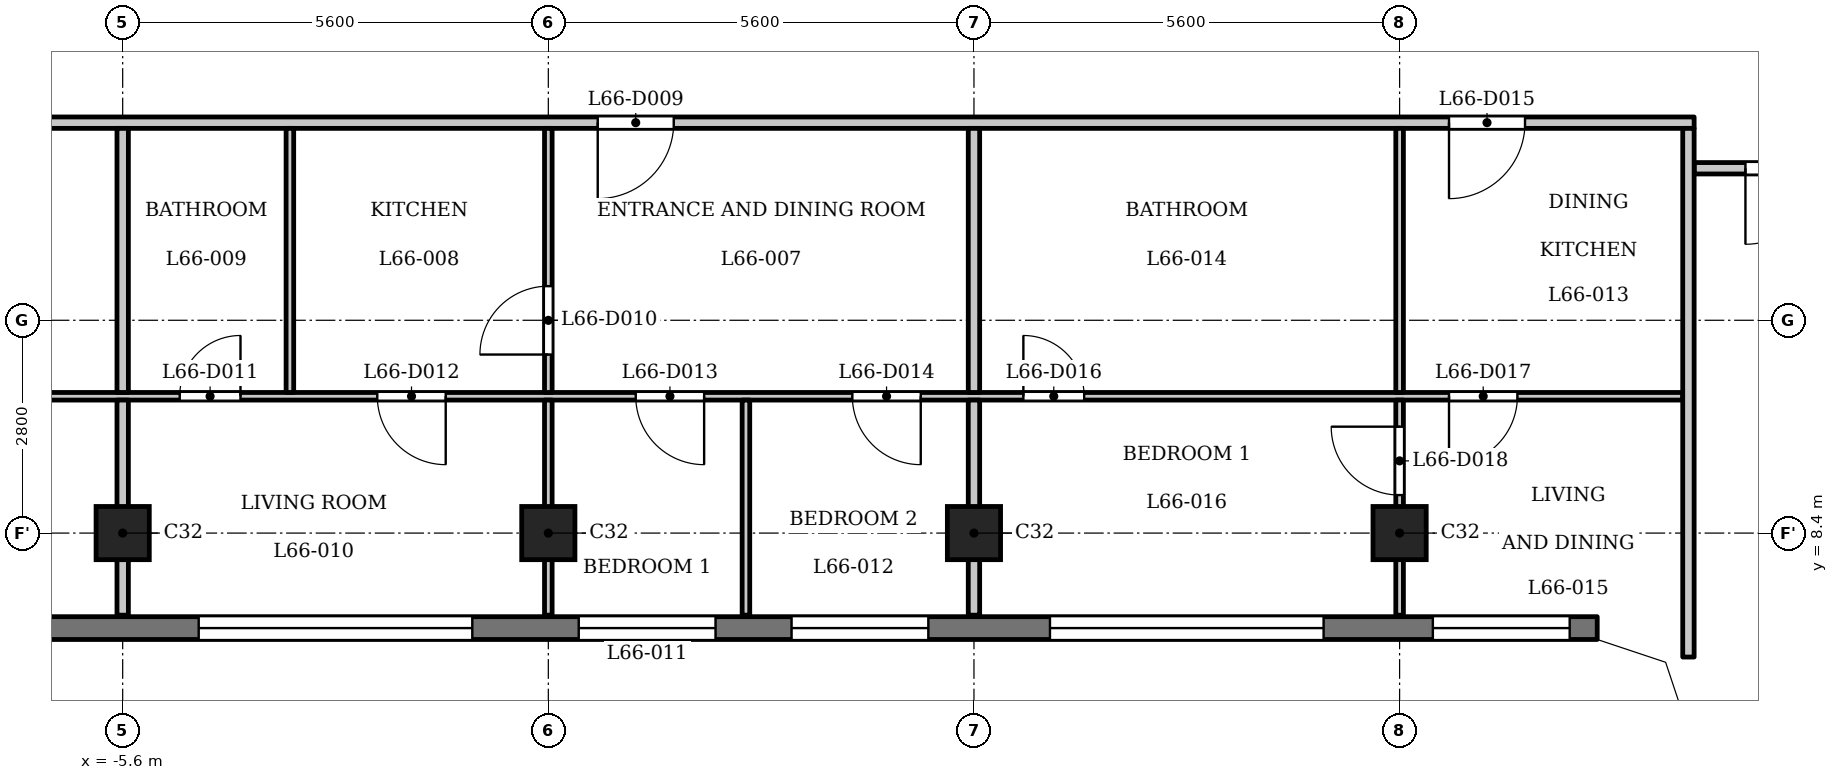
"""IFC4 building model, lengths in metres.
Left out: names, types, materials, properties, quantities, classifications, styles, units other than length and angle.
Written with IfcOpenShell. Run it as: python <this file> out.ifc"""

import sys

from ifc_helpers import new_model, si_unit, direction, frame, frame_2d, origin, origin_2d, place, context, subcontext, project, spatial, polyline, rectangle, outline, extrude, element, fill, save


model = new_model("IFC4")
c1 = context("Model", 3, precision=1e-05, world=origin(), true_north=direction((0.0, 1.0)))
c2 = subcontext(c1, "Body", "Model", "MODEL_VIEW")
j1 = project(units=[si_unit("LENGTHUNIT", "METRE"), si_unit("PLANEANGLEUNIT", "RADIAN")], contexts=[c1])
p1 = place(None, origin())
s1 = spatial("IfcSite", under=j1, at=p1, CompositionType="ELEMENT")
p2 = place(p1, origin())
s2 = spatial("IfcBuilding", under=s1, at=p2, CompositionType="ELEMENT")
p3 = place(p2, frame((0.0, 0.0, 255.7)))
s3 = spatial("IfcBuildingStorey", under=s2, at=p3, CompositionType="ELEMENT", Elevation=255.7)
for number, where, z_axis, x_axis in (
    (1, (-5.6, 8.4, 0.0), (0.0, 0.0, 1.0), (1.0, 0.0, 0.0)),
    (2, (0.0, 8.4, 0.0), (0.0, 0.0, 1.0), (1.0, 0.0, 0.0)),
    (3, (5.6, 8.4, 0.0), (0.0, 0.0, 1.0), (1.0, 0.0, 0.0)),
    (4, (11.2, 8.4, 0.0), (0.0, 0.0, 1.0), (1.0, 0.0, 0.0)),
):
    element("IfcColumn", number, at=place(p3, frame(where, z_axis=z_axis, x_axis=x_axis)), inside=s3, PredefinedType="COLUMN", context=c2, shape_type="SweptSolid", body=[
        extrude(rectangle(XDim=0.7, YDim=0.7, at=origin_2d()), origin(), (0.0, 0.0, 1.0), 3.5),
    ])
p4 = place(p3, frame((-13.8, 7.15, 0.0), z_axis=(0.0, 0.0, 1.0), x_axis=(1.0, 0.0, 0.0)))
e5 = element("IfcWall", 5, at=p4, inside=s3, PredefinedType="SOLIDWALL", context=c2, shape_type="SweptSolid", body=[
    extrude(rectangle(XDim=27.6, YDim=0.3, at=frame_2d((13.8, 0.0))), origin(), (0.0, 0.0, 1.0), 3.2),
])
p5 = place(p4, frame((0.363, 0.0, 0.9)))
e6 = element("IfcOpeningElement", 6, at=p5, cuts=e5, PredefinedType="OPENING", context=c2, shape_type="SweptSolid", body=[
    extrude(rectangle(XDim=1.8, YDim=1.25, at=frame_2d((0.9, 0.625))), frame((0.0, 0.16, 0.0), z_axis=(0.0, -1.0, 0.0), x_axis=(1.0, 0.0, 0.0)), (0.0, 0.0, 1.0), 0.32),
])
p6 = place(p4, frame((3.6, 0.0, 1.2)))
e7 = element("IfcOpeningElement", 7, at=p6, cuts=e5, PredefinedType="OPENING", context=c2, shape_type="SweptSolid", body=[
    extrude(rectangle(XDim=3.6, YDim=0.95, at=frame_2d((1.8, 0.475))), frame((0.0, 0.16, 0.0), z_axis=(0.0, -1.0, 0.0), x_axis=(1.0, 0.0, 0.0)), (0.0, 0.0, 1.0), 0.32),
])
p7 = place(p4, frame((9.2, 0.0, 1.2)))
e8 = element("IfcOpeningElement", 8, at=p7, cuts=e5, PredefinedType="OPENING", context=c2, shape_type="SweptSolid", body=[
    extrude(rectangle(XDim=3.6, YDim=0.95, at=frame_2d((1.8, 0.475))), frame((0.0, 0.16, 0.0), z_axis=(0.0, -1.0, 0.0), x_axis=(1.0, 0.0, 0.0)), (0.0, 0.0, 1.0), 0.32),
])
p8 = place(p4, frame((14.2, 0.0, 0.9)))
e9 = element("IfcOpeningElement", 9, at=p8, cuts=e5, PredefinedType="OPENING", context=c2, shape_type="SweptSolid", body=[
    extrude(rectangle(XDim=1.8, YDim=1.25, at=frame_2d((0.9, 0.625))), frame((0.0, 0.16, 0.0), z_axis=(0.0, -1.0, 0.0), x_axis=(1.0, 0.0, 0.0)), (0.0, 0.0, 1.0), 0.32),
])
p9 = place(p4, frame((17.0, 0.0, 0.9)))
e10 = element("IfcOpeningElement", 10, at=p9, cuts=e5, PredefinedType="OPENING", context=c2, shape_type="SweptSolid", body=[
    extrude(rectangle(XDim=1.8, YDim=1.25, at=frame_2d((0.9, 0.625))), frame((0.0, 0.16, 0.0), z_axis=(0.0, -1.0, 0.0), x_axis=(1.0, 0.0, 0.0)), (0.0, 0.0, 1.0), 0.32),
])
p10 = place(p4, frame((20.4, 0.0, 1.2)))
e11 = element("IfcOpeningElement", 11, at=p10, cuts=e5, PredefinedType="OPENING", context=c2, shape_type="SweptSolid", body=[
    extrude(rectangle(XDim=3.6, YDim=0.95, at=frame_2d((1.8, 0.475))), frame((0.0, 0.16, 0.0), z_axis=(0.0, -1.0, 0.0), x_axis=(1.0, 0.0, 0.0)), (0.0, 0.0, 1.0), 0.32),
])
p11 = place(p4, frame((25.438, 0.0, 0.9)))
e12 = element("IfcOpeningElement", 12, at=p11, cuts=e5, PredefinedType="OPENING", context=c2, shape_type="SweptSolid", body=[
    extrude(rectangle(XDim=1.8, YDim=1.25, at=frame_2d((0.9, 0.625))), frame((0.0, 0.16, 0.0), z_axis=(0.0, -1.0, 0.0), x_axis=(1.0, 0.0, 0.0)), (0.0, 0.0, 1.0), 0.32),
])
p12 = place(p3, frame((-14.925, 10.2, 0.0), z_axis=(0.0, 0.0, 1.0), x_axis=(1.0, 0.0, 0.0)))
e13 = element("IfcWall", 13, at=p12, inside=s3, PredefinedType="PARTITIONING", context=c2, shape_type="SweptSolid", body=[
    extrude(rectangle(XDim=29.85, YDim=0.1, at=frame_2d((14.925, 0.0))), origin(), (0.0, 0.0, 1.0), 3.2),
])
p13 = place(p12, frame((4.375, 0.0, 0.0)))
e14 = element("IfcOpeningElement", 14, at=p13, cuts=e13, PredefinedType="OPENING", context=c2, shape_type="SweptSolid", body=[
    extrude(rectangle(XDim=0.8, YDim=2.1, at=frame_2d((0.4, 1.05))), frame((0.0, 0.06, 0.0), z_axis=(0.0, -1.0, 0.0), x_axis=(1.0, 0.0, 0.0)), (0.0, 0.0, 1.0), 0.12),
])
p14 = place(p12, frame((0.576, 0.0, 0.0)))
e15 = element("IfcOpeningElement", 15, at=p14, cuts=e13, PredefinedType="OPENING", context=c2, shape_type="SweptSolid", body=[
    extrude(rectangle(XDim=0.9, YDim=2.1, at=frame_2d((0.45, 1.05))), frame((0.0, 0.06, 0.0), z_axis=(0.0, -1.0, 0.0), x_axis=(1.0, 0.0, 0.0)), (0.0, 0.0, 1.0), 0.12),
])
p15 = place(p12, frame((10.075, 0.0, 0.0)))
e16 = element("IfcOpeningElement", 16, at=p15, cuts=e13, PredefinedType="OPENING", context=c2, shape_type="SweptSolid", body=[
    extrude(rectangle(XDim=0.8, YDim=2.1, at=frame_2d((0.4, 1.05))), frame((0.0, 0.06, 0.0), z_axis=(0.0, -1.0, 0.0), x_axis=(1.0, 0.0, 0.0)), (0.0, 0.0, 1.0), 0.12),
])
p16 = place(p12, frame((12.675, 0.0, 0.0)))
e17 = element("IfcOpeningElement", 17, at=p16, cuts=e13, PredefinedType="OPENING", context=c2, shape_type="SweptSolid", body=[
    extrude(rectangle(XDim=0.9, YDim=2.1, at=frame_2d((0.45, 1.05))), frame((0.0, 0.06, 0.0), z_axis=(0.0, -1.0, 0.0), x_axis=(1.0, 0.0, 0.0)), (0.0, 0.0, 1.0), 0.12),
])
p17 = place(p12, frame((16.075, 0.0, 0.0)))
e18 = element("IfcOpeningElement", 18, at=p17, cuts=e13, PredefinedType="OPENING", context=c2, shape_type="SweptSolid", body=[
    extrude(rectangle(XDim=0.9, YDim=2.1, at=frame_2d((0.45, 1.05))), frame((0.0, 0.06, 0.0), z_axis=(0.0, -1.0, 0.0), x_axis=(1.0, 0.0, 0.0)), (0.0, 0.0, 1.0), 0.12),
])
p18 = place(p12, frame((18.925, 0.0, 0.0)))
e19 = element("IfcOpeningElement", 19, at=p18, cuts=e13, PredefinedType="OPENING", context=c2, shape_type="SweptSolid", body=[
    extrude(rectangle(XDim=0.9, YDim=2.1, at=frame_2d((0.45, 1.05))), frame((0.0, 0.06, 0.0), z_axis=(0.0, -1.0, 0.0), x_axis=(1.0, 0.0, 0.0)), (0.0, 0.0, 1.0), 0.12),
])
p19 = place(p12, frame((21.175, 0.0, 0.0)))
e20 = element("IfcOpeningElement", 20, at=p19, cuts=e13, PredefinedType="OPENING", context=c2, shape_type="SweptSolid", body=[
    extrude(rectangle(XDim=0.8, YDim=2.1, at=frame_2d((0.4, 1.05))), frame((0.0, 0.06, 0.0), z_axis=(0.0, -1.0, 0.0), x_axis=(1.0, 0.0, 0.0)), (0.0, 0.0, 1.0), 0.12),
])
p20 = place(p12, frame((26.775, 0.0, 0.0)))
e21 = element("IfcOpeningElement", 21, at=p20, cuts=e13, PredefinedType="OPENING", context=c2, shape_type="SweptSolid", body=[
    extrude(rectangle(XDim=0.9, YDim=2.1, at=frame_2d((0.45, 1.05))), frame((0.0, 0.06, 0.0), z_axis=(0.0, -1.0, 0.0), x_axis=(1.0, 0.0, 0.0)), (0.0, 0.0, 1.0), 0.12),
])
p21 = place(p3, frame((15.075, 13.2, 0.0), z_axis=(0.0, 0.0, 1.0), x_axis=(1.0, 0.0, 0.0)))
e22 = element("IfcWall", 22, at=p21, inside=s3, PredefinedType="PARTITIONING", context=c2, shape_type="SweptSolid", body=[
    extrude(rectangle(XDim=2.325, YDim=0.15, at=frame_2d((1.163, 0.0))), origin(), (0.0, 0.0, 1.0), 3.2),
])
p22 = place(p21, frame((0.675, 0.0, 0.0)))
e23 = element("IfcOpeningElement", 23, at=p22, cuts=e22, PredefinedType="OPENING", context=c2, shape_type="SweptSolid", body=[
    extrude(rectangle(XDim=1.0, YDim=2.1, at=frame_2d((0.5, 1.05))), frame((0.0, 0.085, 0.0), z_axis=(0.0, -1.0, 0.0), x_axis=(1.0, 0.0, 0.0)), (0.0, 0.0, 1.0), 0.17),
])
p23 = place(p3, frame((-15.075, 13.8, 0.0), z_axis=(0.0, 0.0, 1.0), x_axis=(1.0, 0.0, 0.0)))
e24 = element("IfcWall", 24, at=p23, inside=s3, PredefinedType="PARTITIONING", context=c2, shape_type="SweptSolid", body=[
    extrude(rectangle(XDim=30.15, YDim=0.15, at=frame_2d((15.075, 0.0))), origin(), (0.0, 0.0, 1.0), 3.2),
])
p24 = place(p23, frame((0.726, 0.0, 0.0)))
e25 = element("IfcOpeningElement", 25, at=p24, cuts=e24, PredefinedType="OPENING", context=c2, shape_type="SweptSolid", body=[
    extrude(rectangle(XDim=1.0, YDim=2.1, at=frame_2d((0.5, 1.05))), frame((0.0, 0.085, 0.0), z_axis=(0.0, -1.0, 0.0), x_axis=(1.0, 0.0, 0.0)), (0.0, 0.0, 1.0), 0.17),
])
p25 = place(p23, frame((15.725, 0.0, 0.0)))
e26 = element("IfcOpeningElement", 26, at=p25, cuts=e24, PredefinedType="OPENING", context=c2, shape_type="SweptSolid", body=[
    extrude(rectangle(XDim=1.0, YDim=2.1, at=frame_2d((0.5, 1.05))), frame((0.0, 0.085, 0.0), z_axis=(0.0, -1.0, 0.0), x_axis=(1.0, 0.0, 0.0)), (0.0, 0.0, 1.0), 0.17),
])
p26 = place(p23, frame((26.925, 0.0, 0.0)))
e27 = element("IfcOpeningElement", 27, at=p26, cuts=e24, PredefinedType="OPENING", context=c2, shape_type="SweptSolid", body=[
    extrude(rectangle(XDim=1.0, YDim=2.1, at=frame_2d((0.5, 1.05))), frame((0.0, 0.085, 0.0), z_axis=(0.0, -1.0, 0.0), x_axis=(1.0, 0.0, 0.0)), (0.0, 0.0, 1.0), 0.17),
])
p27 = place(p3, frame((-5.6, 7.32, 0.0), z_axis=(0.0, 0.0, 1.0), x_axis=(0.0, 1.0, 0.0)))
e28 = element("IfcWall", 28, at=p27, inside=s3, PredefinedType="PARTITIONING", context=c2, shape_type="SweptSolid", body=[
    extrude(rectangle(XDim=2.83, YDim=0.15, at=frame_2d((1.415, 0.0))), origin(), (0.0, 0.0, 1.0), 3.2),
])
p28 = place(p3, frame((-5.6, 10.25, 0.0), z_axis=(0.0, 0.0, 1.0), x_axis=(0.0, 1.0, 0.0)))
e29 = element("IfcWall", 29, at=p28, inside=s3, PredefinedType="PARTITIONING", context=c2, shape_type="SweptSolid", body=[
    extrude(rectangle(XDim=3.475, YDim=0.15, at=frame_2d((1.738, 0.0))), origin(), (0.0, 0.0, 1.0), 3.2),
])
p29 = place(p3, frame((-3.4, 10.25, 0.0), z_axis=(0.0, 0.0, 1.0), x_axis=(0.0, 1.0, 0.0)))
e30 = element("IfcWall", 30, at=p29, inside=s3, PredefinedType="PARTITIONING", context=c2, shape_type="SweptSolid", body=[
    extrude(rectangle(XDim=3.475, YDim=0.1, at=frame_2d((1.738, 0.0))), origin(), (0.0, 0.0, 1.0), 3.2),
])
p30 = place(p3, frame((0.0, 7.32, 0.0), z_axis=(0.0, 0.0, 1.0), x_axis=(0.0, 1.0, 0.0)))
e31 = element("IfcWall", 31, at=p30, inside=s3, PredefinedType="PARTITIONING", context=c2, shape_type="SweptSolid", body=[
    extrude(rectangle(XDim=2.83, YDim=0.1, at=frame_2d((1.415, 0.0))), origin(), (0.0, 0.0, 1.0), 3.2),
])
p31 = place(p3, frame((0.0, 10.25, 0.0), z_axis=(0.0, 0.0, 1.0), x_axis=(0.0, 1.0, 0.0)))
e32 = element("IfcWall", 32, at=p31, inside=s3, PredefinedType="PARTITIONING", context=c2, shape_type="SweptSolid", body=[
    extrude(rectangle(XDim=3.475, YDim=0.1, at=frame_2d((1.738, 0.0))), origin(), (0.0, 0.0, 1.0), 3.2),
])
p32 = place(p31, frame((0.499, 0.0, 0.0)))
e33 = element("IfcOpeningElement", 33, at=p32, cuts=e32, PredefinedType="OPENING", context=c2, shape_type="SweptSolid", body=[
    extrude(rectangle(XDim=0.9, YDim=2.1, at=frame_2d((0.45, 1.05))), frame((0.0, 0.06, 0.0), z_axis=(0.0, -1.0, 0.0), x_axis=(1.0, 0.0, 0.0)), (0.0, 0.0, 1.0), 0.12),
])
p33 = place(p3, frame((2.6, 7.32, 0.0), z_axis=(0.0, 0.0, 1.0), x_axis=(0.0, 1.0, 0.0)))
e34 = element("IfcWall", 34, at=p33, inside=s3, PredefinedType="PARTITIONING", context=c2, shape_type="SweptSolid", body=[
    extrude(rectangle(XDim=2.83, YDim=0.1, at=frame_2d((1.415, 0.0))), origin(), (0.0, 0.0, 1.0), 3.2),
])
p34 = place(p3, frame((5.6, 7.32, 0.0), z_axis=(0.0, 0.0, 1.0), x_axis=(0.0, 1.0, 0.0)))
e35 = element("IfcWall", 35, at=p34, inside=s3, PredefinedType="PARTITIONING", context=c2, shape_type="SweptSolid", body=[
    extrude(rectangle(XDim=2.83, YDim=0.15, at=frame_2d((1.415, 0.0))), origin(), (0.0, 0.0, 1.0), 3.2),
])
p35 = place(p3, frame((5.6, 10.25, 0.0), z_axis=(0.0, 0.0, 1.0), x_axis=(0.0, 1.0, 0.0)))
e36 = element("IfcWall", 36, at=p35, inside=s3, PredefinedType="PARTITIONING", context=c2, shape_type="SweptSolid", body=[
    extrude(rectangle(XDim=3.475, YDim=0.15, at=frame_2d((1.738, 0.0))), origin(), (0.0, 0.0, 1.0), 3.2),
])
p36 = place(p3, frame((11.2, 7.32, 0.0), z_axis=(0.0, 0.0, 1.0), x_axis=(0.0, 1.0, 0.0)))
e37 = element("IfcWall", 37, at=p36, inside=s3, PredefinedType="PARTITIONING", context=c2, shape_type="SweptSolid", body=[
    extrude(rectangle(XDim=2.83, YDim=0.1, at=frame_2d((1.415, 0.0))), origin(), (0.0, 0.0, 1.0), 3.2),
])
p37 = place(p36, frame((1.58, 0.0, 0.0)))
e38 = element("IfcOpeningElement", 38, at=p37, cuts=e37, PredefinedType="OPENING", context=c2, shape_type="SweptSolid", body=[
    extrude(rectangle(XDim=0.9, YDim=2.1, at=frame_2d((0.45, 1.05))), frame((0.0, 0.06, 0.0), z_axis=(0.0, -1.0, 0.0), x_axis=(1.0, 0.0, 0.0)), (0.0, 0.0, 1.0), 0.12),
])
p38 = place(p3, frame((11.2, 10.25, 0.0), z_axis=(0.0, 0.0, 1.0), x_axis=(0.0, 1.0, 0.0)))
e39 = element("IfcWall", 39, at=p38, inside=s3, PredefinedType="PARTITIONING", context=c2, shape_type="SweptSolid", body=[
    extrude(rectangle(XDim=3.475, YDim=0.1, at=frame_2d((1.738, 0.0))), origin(), (0.0, 0.0, 1.0), 3.2),
])
p39 = place(p3, frame((15.0, 6.769, 0.0), z_axis=(0.0, 0.0, 1.0), x_axis=(0.0, 1.0, 0.0)))
e40 = element("IfcWall", 40, at=p39, inside=s3, PredefinedType="PARTITIONING", context=c2, shape_type="SweptSolid", body=[
    extrude(rectangle(XDim=6.956, YDim=0.15, at=frame_2d((3.478, 0.0))), origin(), (0.0, 0.0, 1.0), 3.2),
])
p40 = place(p3, origin())
e41 = element("IfcWall", 41, at=p40, inside=s3, PredefinedType="SOLIDWALL", context=c2, shape_type="SweptSolid", body=[
    extrude(outline(polyline([(14.937, 6.937), (13.849, 7.3), (13.8, 7.3), (13.8, 7.0), (14.7, 6.7), (15.0, 5.8), (15.3, 5.8), (15.3, 5.849), (14.937, 6.937)])), origin(), (0.0, 0.0, 1.0), 3.2),
])
p41 = place(p22, origin())
e42 = element("IfcDoor", 42, at=p41, inside=s3, OperationType="SINGLE_SWING_LEFT", PredefinedType="DOOR", context=c2, shape_type="SweptSolid", body=[
    extrude(rectangle(XDim=1.0, YDim=2.1, at=frame_2d((0.5, 1.05))), frame((0.0, 0.025, 0.0), z_axis=(0.0, -1.0, 0.0), x_axis=(1.0, 0.0, 0.0)), (0.0, 0.0, 1.0), 0.05),
])
fill(e23, e42)
p42 = place(p25, origin())
e43 = element("IfcDoor", 43, at=p42, inside=s3, OperationType="SINGLE_SWING_LEFT", PredefinedType="DOOR", context=c2, shape_type="SweptSolid", body=[
    extrude(rectangle(XDim=1.0, YDim=2.1, at=frame_2d((0.5, 1.05))), frame((0.0, 0.025, 0.0), z_axis=(0.0, -1.0, 0.0), x_axis=(1.0, 0.0, 0.0)), (0.0, 0.0, 1.0), 0.05),
])
fill(e26, e43)
p43 = place(p32, origin())
e44 = element("IfcDoor", 44, at=p43, inside=s3, OperationType="SINGLE_SWING_RIGHT", PredefinedType="DOOR", context=c2, shape_type="SweptSolid", body=[
    extrude(rectangle(XDim=0.9, YDim=2.1, at=frame_2d((0.45, 1.05))), frame((0.0, 0.025, 0.0), z_axis=(0.0, -1.0, 0.0), x_axis=(1.0, 0.0, 0.0)), (0.0, 0.0, 1.0), 0.05),
])
fill(e33, e44)
p44 = place(p15, origin())
e45 = element("IfcDoor", 45, at=p44, inside=s3, OperationType="SINGLE_SWING_LEFT", PredefinedType="DOOR", context=c2, shape_type="SweptSolid", body=[
    extrude(rectangle(XDim=0.8, YDim=2.1, at=frame_2d((0.4, 1.05))), frame((0.0, 0.025, 0.0), z_axis=(0.0, -1.0, 0.0), x_axis=(1.0, 0.0, 0.0)), (0.0, 0.0, 1.0), 0.05),
])
fill(e16, e45)
p45 = place(p16, origin())
e46 = element("IfcDoor", 46, at=p45, inside=s3, OperationType="SINGLE_SWING_RIGHT", PredefinedType="DOOR", context=c2, shape_type="SweptSolid", body=[
    extrude(rectangle(XDim=0.9, YDim=2.1, at=frame_2d((0.45, 1.05))), frame((0.0, 0.025, 0.0), z_axis=(0.0, -1.0, 0.0), x_axis=(1.0, 0.0, 0.0)), (0.0, 0.0, 1.0), 0.05),
])
fill(e17, e46)
p46 = place(p17, origin())
e47 = element("IfcDoor", 47, at=p46, inside=s3, OperationType="SINGLE_SWING_RIGHT", PredefinedType="DOOR", context=c2, shape_type="SweptSolid", body=[
    extrude(rectangle(XDim=0.9, YDim=2.1, at=frame_2d((0.45, 1.05))), frame((0.0, 0.025, 0.0), z_axis=(0.0, -1.0, 0.0), x_axis=(1.0, 0.0, 0.0)), (0.0, 0.0, 1.0), 0.05),
])
fill(e18, e47)
p47 = place(p18, origin())
e48 = element("IfcDoor", 48, at=p47, inside=s3, OperationType="SINGLE_SWING_RIGHT", PredefinedType="DOOR", context=c2, shape_type="SweptSolid", body=[
    extrude(rectangle(XDim=0.9, YDim=2.1, at=frame_2d((0.45, 1.05))), frame((0.0, 0.025, 0.0), z_axis=(0.0, -1.0, 0.0), x_axis=(1.0, 0.0, 0.0)), (0.0, 0.0, 1.0), 0.05),
])
fill(e19, e48)
p48 = place(p26, origin())
e49 = element("IfcDoor", 49, at=p48, inside=s3, OperationType="SINGLE_SWING_LEFT", PredefinedType="DOOR", context=c2, shape_type="SweptSolid", body=[
    extrude(rectangle(XDim=1.0, YDim=2.1, at=frame_2d((0.5, 1.05))), frame((0.0, 0.025, 0.0), z_axis=(0.0, -1.0, 0.0), x_axis=(1.0, 0.0, 0.0)), (0.0, 0.0, 1.0), 0.05),
])
fill(e27, e49)
p49 = place(p19, origin())
e50 = element("IfcDoor", 50, at=p49, inside=s3, OperationType="SINGLE_SWING_RIGHT", PredefinedType="DOOR", context=c2, shape_type="SweptSolid", body=[
    extrude(rectangle(XDim=0.8, YDim=2.1, at=frame_2d((0.4, 1.05))), frame((0.0, 0.025, 0.0), z_axis=(0.0, -1.0, 0.0), x_axis=(1.0, 0.0, 0.0)), (0.0, 0.0, 1.0), 0.05),
])
fill(e20, e50)
p50 = place(p20, origin())
e51 = element("IfcDoor", 51, at=p50, inside=s3, OperationType="SINGLE_SWING_LEFT", PredefinedType="DOOR", context=c2, shape_type="SweptSolid", body=[
    extrude(rectangle(XDim=0.9, YDim=2.1, at=frame_2d((0.45, 1.05))), frame((0.0, 0.025, 0.0), z_axis=(0.0, -1.0, 0.0), x_axis=(1.0, 0.0, 0.0)), (0.0, 0.0, 1.0), 0.05),
])
fill(e21, e51)
p51 = place(p37, origin())
e52 = element("IfcDoor", 52, at=p51, inside=s3, OperationType="SINGLE_SWING_LEFT", PredefinedType="DOOR", context=c2, shape_type="SweptSolid", body=[
    extrude(rectangle(XDim=0.9, YDim=2.1, at=frame_2d((0.45, 1.05))), frame((0.0, 0.025, 0.0), z_axis=(0.0, -1.0, 0.0), x_axis=(1.0, 0.0, 0.0)), (0.0, 0.0, 1.0), 0.05),
])
fill(e38, e52)
p52 = place(p7, origin())
e53 = element("IfcWindow", 53, at=p52, inside=s3, PartitioningType="SINGLE_PANEL", PredefinedType="WINDOW", context=c2, shape_type="SweptSolid", body=[
    extrude(rectangle(XDim=3.6, YDim=0.95, at=frame_2d((1.8, 0.475))), frame((0.0, 0.03, 0.0), z_axis=(0.0, -1.0, 0.0), x_axis=(1.0, 0.0, 0.0)), (0.0, 0.0, 1.0), 0.06),
])
fill(e8, e53)
p53 = place(p8, origin())
e54 = element("IfcWindow", 54, at=p53, inside=s3, PartitioningType="SINGLE_PANEL", PredefinedType="WINDOW", context=c2, shape_type="SweptSolid", body=[
    extrude(rectangle(XDim=1.8, YDim=1.25, at=frame_2d((0.9, 0.625))), frame((0.0, 0.03, 0.0), z_axis=(0.0, -1.0, 0.0), x_axis=(1.0, 0.0, 0.0)), (0.0, 0.0, 1.0), 0.06),
])
fill(e9, e54)
p54 = place(p9, origin())
e55 = element("IfcWindow", 55, at=p54, inside=s3, PartitioningType="SINGLE_PANEL", PredefinedType="WINDOW", context=c2, shape_type="SweptSolid", body=[
    extrude(rectangle(XDim=1.8, YDim=1.25, at=frame_2d((0.9, 0.625))), frame((0.0, 0.03, 0.0), z_axis=(0.0, -1.0, 0.0), x_axis=(1.0, 0.0, 0.0)), (0.0, 0.0, 1.0), 0.06),
])
fill(e10, e55)
p55 = place(p10, origin())
e56 = element("IfcWindow", 56, at=p55, inside=s3, PartitioningType="SINGLE_PANEL", PredefinedType="WINDOW", context=c2, shape_type="SweptSolid", body=[
    extrude(rectangle(XDim=3.6, YDim=0.95, at=frame_2d((1.8, 0.475))), frame((0.0, 0.03, 0.0), z_axis=(0.0, -1.0, 0.0), x_axis=(1.0, 0.0, 0.0)), (0.0, 0.0, 1.0), 0.06),
])
fill(e11, e56)
p56 = place(p11, origin())
e57 = element("IfcWindow", 57, at=p56, inside=s3, PartitioningType="SINGLE_PANEL", PredefinedType="WINDOW", context=c2, shape_type="SweptSolid", body=[
    extrude(rectangle(XDim=1.8, YDim=1.25, at=frame_2d((0.9, 0.625))), frame((0.0, 0.03, 0.0), z_axis=(0.0, -1.0, 0.0), x_axis=(1.0, 0.0, 0.0)), (0.0, 0.0, 1.0), 0.06),
])
fill(e12, e57)
save(model, sys.argv[1])
